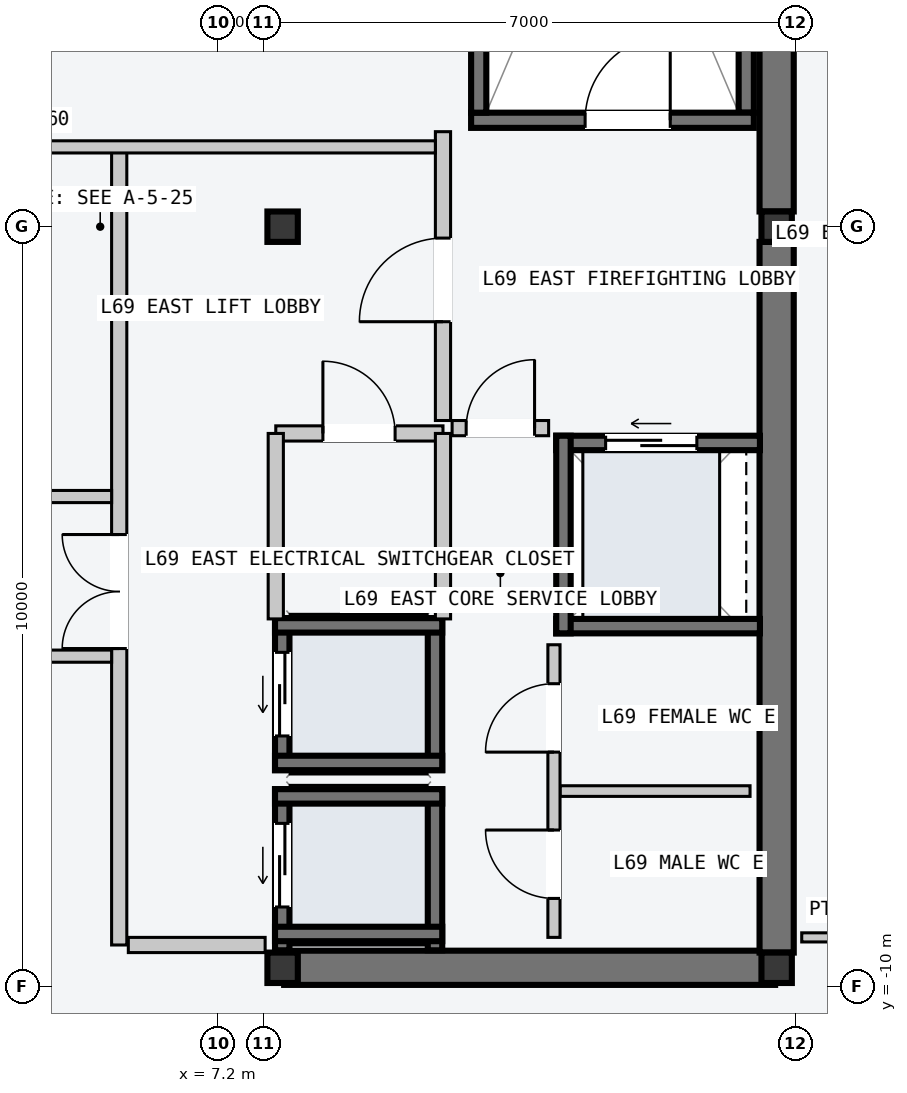
"""IFC4 building model, lengths in metres.
Left out: names, types, materials, properties, quantities, classifications, styles, units other than length and angle.
Written with IfcOpenShell. Run it as: python <this file> out.ifc"""

import sys

from ifc_helpers import new_model, si_unit, direction, frame, frame_2d, origin, origin_2d, place, context, subcontext, project, spatial, rectangle, i_section, extrude, element, fill, save


model = new_model("IFC4")
c1 = context("Model", 3, precision=1e-05, world=origin(), true_north=direction((0.0, 1.0)))
c2 = subcontext(c1, "Body", "Model", "MODEL_VIEW")
j1 = project(units=[si_unit("LENGTHUNIT", "METRE"), si_unit("PLANEANGLEUNIT", "RADIAN")], contexts=[c1])
p1 = place(None, origin())
s1 = spatial("IfcSite", under=j1, at=p1, CompositionType="ELEMENT")
p2 = place(p1, origin())
s2 = spatial("IfcBuilding", under=s1, at=p2, CompositionType="ELEMENT")
p3 = place(p2, frame((0.0, 0.0, 261.6)))
s3 = spatial("IfcBuildingStorey", under=s2, at=p3, CompositionType="ELEMENT", Elevation=261.6)
p4 = place(p3, frame((8.07, -9.75, -0.2), z_axis=(0.0, 0.0, 1.0), x_axis=(1.0, 0.0, 0.0)))
e1 = element("IfcWall", 1, at=p4, inside=s3, PredefinedType="SHEAR", context=c2, shape_type="SweptSolid", body=[
    extrude(rectangle(XDim=6.46, YDim=0.45, at=frame_2d((3.23, 0.0))), origin(), (0.0, 0.0, 1.0), 3.6),
])
for number, where, z_axis, x_axis in (
    (2, (14.55, -9.55, -0.2), (0.0, 0.0, 1.0), (0.0, 1.0, 0.0)),
    (3, (14.55, 0.2, -0.2), (0.0, 0.0, 1.0), (0.0, 1.0, 0.0)),
):
    element("IfcWall", number, at=place(p3, frame(where, z_axis=z_axis, x_axis=x_axis)), inside=s3, PredefinedType="SHEAR", context=c2, shape_type="SweptSolid", body=[
        extrude(rectangle(XDim=9.35, YDim=0.45, at=frame_2d((4.675, 0.0))), origin(), (0.0, 0.0, 1.0), 3.6),
    ])
p5 = place(p3, frame((14.15, 1.5, -0.2), z_axis=(0.0, 0.0, 1.0), x_axis=(0.0, 1.0, 0.0)))
e4 = element("IfcWall", 4, at=p5, inside=s3, PredefinedType="SOLIDWALL", context=c2, shape_type="SweptSolid", body=[
    extrude(rectangle(XDim=7.8, YDim=0.2, at=frame_2d((3.9, 0.0))), origin(), (0.0, 0.0, 1.0), 3.6),
])
p6 = place(p3, frame((10.53, 1.4, -0.2), z_axis=(0.0, 0.0, 1.0), x_axis=(1.0, 0.0, 0.0)))
e5 = element("IfcWall", 5, at=p6, inside=s3, PredefinedType="SOLIDWALL", context=c2, shape_type="SweptSolid", body=[
    extrude(rectangle(XDim=3.72, YDim=0.2, at=frame_2d((1.86, 0.0))), origin(), (0.0, 0.0, 1.0), 3.6),
])
p7 = place(p6, frame((1.5, 0.0, 0.2)))
e6 = element("IfcOpeningElement", 6, at=p7, cuts=e5, PredefinedType="OPENING", context=c2, shape_type="SweptSolid", body=[
    extrude(rectangle(XDim=1.12, YDim=2.18, at=frame_2d((0.56, 1.09))), frame((0.0, 0.11, 0.0), z_axis=(0.0, -1.0, 0.0), x_axis=(1.0, 0.0, 0.0)), (0.0, 0.0, 1.0), 0.22),
])
p8 = place(p3, frame((10.63, 1.5, -0.2), z_axis=(0.0, 0.0, 1.0), x_axis=(0.0, 1.0, 0.0)))
e7 = element("IfcWall", 7, at=p8, inside=s3, PredefinedType="SOLIDWALL", context=c2, shape_type="SweptSolid", body=[
    extrude(rectangle(XDim=7.8, YDim=0.2, at=frame_2d((3.9, 0.0))), origin(), (0.0, 0.0, 1.0), 3.6),
])
for number, where, z_axis, x_axis in (
    (8, (8.05, -9.75, 0.0), (0.0, 0.0, 1.0), (1.0, 0.0, 0.0)),
    (9, (8.05, 0.0, 0.0), (0.0, 0.0, 1.0), (1.0, 0.0, 0.0)),
    (10, (14.55, -9.75, 0.0), (0.0, 0.0, 1.0), (1.0, 0.0, 0.0)),
    (11, (14.55, 0.0, 0.0), (0.0, 0.0, 1.0), (1.0, 0.0, 0.0)),
):
    element("IfcColumn", number, at=place(p3, frame(where, z_axis=z_axis, x_axis=x_axis)), inside=s3, PredefinedType="COLUMN", context=c2, shape_type="SweptSolid", body=[
        extrude(i_section(OverallWidth=0.4, OverallDepth=0.4, WebThickness=0.013, FlangeThickness=0.021, at=origin_2d()), origin(), (0.0, 0.0, 1.0), 3.6),
    ])
p9 = place(p3, frame((8.045, -9.52, -0.2), z_axis=(0.0, 0.0, 1.0), x_axis=(0.0, 1.0, 0.0)))
e12 = element("IfcWall", 12, at=p9, inside=s3, PredefinedType="SOLIDWALL", context=c2, shape_type="SweptSolid", body=[
    extrude(rectangle(XDim=2.12, YDim=0.19, at=frame_2d((1.06, 0.0))), origin(), (0.0, 0.0, 1.0), 3.6),
])
p10 = place(p9, frame((0.57, 0.0, 0.2)))
e13 = element("IfcOpeningElement", 13, at=p10, cuts=e12, PredefinedType="OPENING", context=c2, shape_type="SweptSolid", body=[
    extrude(rectangle(XDim=1.1, YDim=2.2, at=frame_2d((0.55, 1.1))), frame((0.0, 0.105, 0.0), z_axis=(0.0, -1.0, 0.0), x_axis=(1.0, 0.0, 0.0)), (0.0, 0.0, 1.0), 0.21),
])
p11 = place(p3, frame((10.055, -9.52, -0.2), z_axis=(0.0, 0.0, 1.0), x_axis=(0.0, 1.0, 0.0)))
e14 = element("IfcWall", 14, at=p11, inside=s3, PredefinedType="SOLIDWALL", context=c2, shape_type="SweptSolid", body=[
    extrude(rectangle(XDim=2.12, YDim=0.19, at=frame_2d((1.06, 0.0))), origin(), (0.0, 0.0, 1.0), 3.6),
])
for number, where, z_axis, x_axis in (
    (15, (7.95, -7.495, -0.2), (0.0, 0.0, 1.0), (1.0, 0.0, 0.0)),
    (16, (7.95, -9.305, -0.2), (0.0, 0.0, 1.0), (1.0, 0.0, 0.0)),
):
    element("IfcWall", number, at=place(p3, frame(where, z_axis=z_axis, x_axis=x_axis)), inside=s3, PredefinedType="SOLIDWALL", context=c2, shape_type="SweptSolid", body=[
        extrude(rectangle(XDim=2.2, YDim=0.19, at=frame_2d((1.1, 0.0))), origin(), (0.0, 0.0, 1.0), 3.6),
    ])
p12 = place(p3, frame((8.045, -7.15, -0.2), z_axis=(0.0, 0.0, 1.0), x_axis=(0.0, 1.0, 0.0)))
e17 = element("IfcWall", 17, at=p12, inside=s3, PredefinedType="SOLIDWALL", context=c2, shape_type="SweptSolid", body=[
    extrude(rectangle(XDim=2.0, YDim=0.19, at=frame_2d((1.0, 0.0))), origin(), (0.0, 0.0, 1.0), 3.6),
])
p13 = place(p12, frame((0.45, 0.0, 0.2)))
e18 = element("IfcOpeningElement", 18, at=p13, cuts=e17, PredefinedType="OPENING", context=c2, shape_type="SweptSolid", body=[
    extrude(rectangle(XDim=1.1, YDim=2.2, at=frame_2d((0.55, 1.1))), frame((0.0, 0.105, 0.0), z_axis=(0.0, -1.0, 0.0), x_axis=(1.0, 0.0, 0.0)), (0.0, 0.0, 1.0), 0.21),
])
p14 = place(p3, frame((10.055, -7.15, -0.2), z_axis=(0.0, 0.0, 1.0), x_axis=(0.0, 1.0, 0.0)))
e19 = element("IfcWall", 19, at=p14, inside=s3, PredefinedType="SOLIDWALL", context=c2, shape_type="SweptSolid", body=[
    extrude(rectangle(XDim=2.0, YDim=0.19, at=frame_2d((1.0, 0.0))), origin(), (0.0, 0.0, 1.0), 3.6),
])
for number, where, z_axis, x_axis in (
    (20, (7.95, -5.245, -0.2), (0.0, 0.0, 1.0), (1.0, 0.0, 0.0)),
    (21, (7.95, -7.055, -0.2), (0.0, 0.0, 1.0), (1.0, 0.0, 0.0)),
):
    element("IfcWall", number, at=place(p3, frame(where, z_axis=z_axis, x_axis=x_axis)), inside=s3, PredefinedType="SOLIDWALL", context=c2, shape_type="SweptSolid", body=[
        extrude(rectangle(XDim=2.2, YDim=0.19, at=frame_2d((1.1, 0.0))), origin(), (0.0, 0.0, 1.0), 3.6),
    ])
p15 = place(p3, frame((11.65, -2.845, -0.2), z_axis=(0.0, 0.0, 1.0), x_axis=(1.0, 0.0, 0.0)))
e22 = element("IfcWall", 22, at=p15, inside=s3, PredefinedType="SOLIDWALL", context=c2, shape_type="SweptSolid", body=[
    extrude(rectangle(XDim=2.68, YDim=0.19, at=frame_2d((1.34, 0.0))), origin(), (0.0, 0.0, 1.0), 3.6),
])
p16 = place(p15, frame((0.65, 0.0, 0.2)))
e23 = element("IfcOpeningElement", 23, at=p16, cuts=e22, PredefinedType="OPENING", context=c2, shape_type="SweptSolid", body=[
    extrude(rectangle(XDim=1.2, YDim=2.2, at=frame_2d((0.6, 1.1))), frame((0.0, 0.105, 0.0), z_axis=(0.0, -1.0, 0.0), x_axis=(1.0, 0.0, 0.0)), (0.0, 0.0, 1.0), 0.21),
])
p17 = place(p3, frame((11.65, -5.255, -0.2), z_axis=(0.0, 0.0, 1.0), x_axis=(1.0, 0.0, 0.0)))
e24 = element("IfcWall", 24, at=p17, inside=s3, PredefinedType="SOLIDWALL", context=c2, shape_type="SweptSolid", body=[
    extrude(rectangle(XDim=2.68, YDim=0.19, at=frame_2d((1.34, 0.0))), origin(), (0.0, 0.0, 1.0), 3.6),
])
p18 = place(p3, frame((11.745, -5.35, -0.2), z_axis=(0.0, 0.0, 1.0), x_axis=(0.0, 1.0, 0.0)))
e25 = element("IfcWall", 25, at=p18, inside=s3, PredefinedType="SOLIDWALL", context=c2, shape_type="SweptSolid", body=[
    extrude(rectangle(XDim=2.6, YDim=0.19, at=frame_2d((1.3, 0.0))), origin(), (0.0, 0.0, 1.0), 3.6),
])
p19 = place(p3, frame((5.9, -9.45, 0.0), z_axis=(0.0, 0.0, 1.0), x_axis=(0.0, 1.0, 0.0)))
e26 = element("IfcWall", 26, at=p19, inside=s3, PredefinedType="PARTITIONING", context=c2, shape_type="SweptSolid", body=[
    extrude(rectangle(XDim=10.5, YDim=0.2, at=frame_2d((5.25, 0.0))), origin(), (0.0, 0.0, 1.0), 3.4),
])
p20 = place(p19, frame((3.9, 0.0, 0.0)))
e27 = element("IfcOpeningElement", 27, at=p20, cuts=e26, PredefinedType="OPENING", context=c2, shape_type="SweptSolid", body=[
    extrude(rectangle(XDim=1.5, YDim=2.2, at=frame_2d((0.75, 1.1))), frame((0.0, 0.11, 0.0), z_axis=(0.0, -1.0, 0.0), x_axis=(1.0, 0.0, 0.0)), (0.0, 0.0, 1.0), 0.22),
])
p21 = place(p3, frame((6.02, -9.45, 0.0), z_axis=(0.0, 0.0, 1.0), x_axis=(1.0, 0.0, 0.0)))
e28 = element("IfcWall", 28, at=p21, inside=s3, PredefinedType="PARTITIONING", context=c2, shape_type="SweptSolid", body=[
    extrude(rectangle(XDim=1.8, YDim=0.2, at=frame_2d((0.9, 0.0))), origin(), (0.0, 0.0, 1.0), 3.4),
])
p22 = place(p3, frame((10.16, -2.55, 0.0), z_axis=(0.0, 0.0, 1.0), x_axis=(0.0, 1.0, 0.0)))
e29 = element("IfcWall", 29, at=p22, inside=s3, PredefinedType="PARTITIONING", context=c2, shape_type="SweptSolid", body=[
    extrude(rectangle(XDim=3.8, YDim=0.2, at=frame_2d((1.9, 0.0))), origin(), (0.0, 0.0, 1.0), 3.4),
])
p23 = place(p22, frame((1.3, 0.0, 0.0)))
e30 = element("IfcOpeningElement", 30, at=p23, cuts=e29, PredefinedType="OPENING", context=c2, shape_type="SweptSolid", body=[
    extrude(rectangle(XDim=1.1, YDim=2.15, at=frame_2d((0.55, 1.075))), frame((0.0, 0.11, 0.0), z_axis=(0.0, -1.0, 0.0), x_axis=(1.0, 0.0, 0.0)), (0.0, 0.0, 1.0), 0.22),
])
p24 = place(p3, frame((10.28, -2.65, 0.0), z_axis=(0.0, 0.0, 1.0), x_axis=(1.0, 0.0, 0.0)))
e31 = element("IfcWall", 31, at=p24, inside=s3, PredefinedType="PARTITIONING", context=c2, shape_type="SweptSolid", body=[
    extrude(rectangle(XDim=1.27, YDim=0.2, at=frame_2d((0.635, 0.0))), origin(), (0.0, 0.0, 1.0), 3.4),
])
p25 = place(p24, frame((0.185, 0.0, 0.0)))
e32 = element("IfcOpeningElement", 32, at=p25, cuts=e31, PredefinedType="OPENING", context=c2, shape_type="SweptSolid", body=[
    extrude(rectangle(XDim=0.9, YDim=2.15, at=frame_2d((0.45, 1.075))), frame((0.0, 0.11, 0.0), z_axis=(0.0, -1.0, 0.0), x_axis=(1.0, 0.0, 0.0)), (0.0, 0.0, 1.0), 0.22),
])
p26 = place(p3, frame((7.96, -2.72, 0.0), z_axis=(0.0, 0.0, 1.0), x_axis=(1.0, 0.0, 0.0)))
e33 = element("IfcWall", 33, at=p26, inside=s3, PredefinedType="PARTITIONING", context=c2, shape_type="SweptSolid", body=[
    extrude(rectangle(XDim=2.2, YDim=0.2, at=frame_2d((1.1, 0.0))), origin(), (0.0, 0.0, 1.0), 3.4),
])
p27 = place(p26, frame((0.62, 0.0, 0.0)))
e34 = element("IfcOpeningElement", 34, at=p27, cuts=e33, PredefinedType="OPENING", context=c2, shape_type="SweptSolid", body=[
    extrude(rectangle(XDim=0.95, YDim=2.1, at=frame_2d((0.475, 1.05))), frame((0.0, 0.11, 0.0), z_axis=(0.0, -1.0, 0.0), x_axis=(1.0, 0.0, 0.0)), (0.0, 0.0, 1.0), 0.22),
])
for number, where, z_axis, x_axis in (
    (35, (7.96, -5.16, 0.0), (0.0, 0.0, 1.0), (0.0, 1.0, 0.0)),
    (36, (10.16, -5.16, 0.0), (0.0, 0.0, 1.0), (0.0, 1.0, 0.0)),
):
    element("IfcWall", number, at=place(p3, frame(where, z_axis=z_axis, x_axis=x_axis)), inside=s3, PredefinedType="PARTITIONING", context=c2, shape_type="SweptSolid", body=[
        extrude(rectangle(XDim=2.44, YDim=0.2, at=frame_2d((1.22, 0.0))), origin(), (0.0, 0.0, 1.0), 3.4),
    ])
p28 = place(p3, frame((11.7, -7.425, 0.0), z_axis=(0.0, 0.0, 1.0), x_axis=(1.0, 0.0, 0.0)))
e37 = element("IfcWall", 37, at=p28, inside=s3, PredefinedType="PARTITIONING", context=c2, shape_type="SweptSolid", body=[
    extrude(rectangle(XDim=2.5, YDim=0.14, at=frame_2d((1.25, 0.0))), origin(), (0.0, 0.0, 1.0), 3.4),
])
p29 = place(p3, frame((11.62, -9.35, 0.0), z_axis=(0.0, 0.0, 1.0), x_axis=(0.0, 1.0, 0.0)))
e38 = element("IfcWall", 38, at=p29, inside=s3, PredefinedType="PARTITIONING", context=c2, shape_type="SweptSolid", body=[
    extrude(rectangle(XDim=3.85, YDim=0.16, at=frame_2d((1.925, 0.0))), origin(), (0.0, 0.0, 1.0), 3.4),
])
p30 = place(p29, frame((0.512, 0.0, 0.0)))
e39 = element("IfcOpeningElement", 39, at=p30, cuts=e38, PredefinedType="OPENING", context=c2, shape_type="SweptSolid", body=[
    extrude(rectangle(XDim=0.9, YDim=2.15, at=frame_2d((0.45, 1.075))), frame((0.0, 0.09, 0.0), z_axis=(0.0, -1.0, 0.0), x_axis=(1.0, 0.0, 0.0)), (0.0, 0.0, 1.0), 0.18),
])
p31 = place(p29, frame((2.438, 0.0, 0.0)))
e40 = element("IfcOpeningElement", 40, at=p31, cuts=e38, PredefinedType="OPENING", context=c2, shape_type="SweptSolid", body=[
    extrude(rectangle(XDim=0.9, YDim=2.15, at=frame_2d((0.45, 1.075))), frame((0.0, 0.09, 0.0), z_axis=(0.0, -1.0, 0.0), x_axis=(1.0, 0.0, 0.0)), (0.0, 0.0, 1.0), 0.18),
])
p32 = place(p3, frame((-0.49, 1.05, 0.0), z_axis=(0.0, 0.0, 1.0), x_axis=(1.0, 0.0, 0.0)))
e41 = element("IfcWall", 41, at=p32, inside=s3, PredefinedType="PARTITIONING", context=c2, shape_type="SweptSolid", body=[
    extrude(rectangle(XDim=10.55, YDim=0.16, at=frame_2d((5.275, 0.0))), origin(), (0.0, 0.0, 1.0), 3.4),
])
for number, where, z_axis, x_axis in (
    (42, (-0.49, -3.55, 0.0), (0.0, 0.0, 1.0), (1.0, 0.0, 0.0)),
    (43, (-0.49, -5.65, 0.0), (0.0, 0.0, 1.0), (1.0, 0.0, 0.0)),
):
    element("IfcWall", number, at=place(p3, frame(where, z_axis=z_axis, x_axis=x_axis)), inside=s3, PredefinedType="PARTITIONING", context=c2, shape_type="SweptSolid", body=[
        extrude(rectangle(XDim=6.29, YDim=0.16, at=frame_2d((3.145, 0.0))), origin(), (0.0, 0.0, 1.0), 3.4),
    ])
p33 = place(p3, frame((14.88, -9.35, 0.0), z_axis=(0.0, 0.0, 1.0), x_axis=(1.0, 0.0, 0.0)))
e44 = element("IfcWall", 44, at=p33, inside=s3, PredefinedType="PARTITIONING", context=c2, shape_type="SweptSolid", body=[
    extrude(rectangle(XDim=3.68, YDim=0.12, at=frame_2d((1.84, 0.0))), origin(), (0.0, 0.0, 1.0), 3.4),
])
p34 = place(p33, frame((1.36, 0.0, 0.0)))
e45 = element("IfcOpeningElement", 45, at=p34, cuts=e44, PredefinedType="OPENING", context=c2, shape_type="SweptSolid", body=[
    extrude(rectangle(XDim=0.96, YDim=2.18, at=frame_2d((0.48, 1.09))), frame((0.0, 0.07, 0.0), z_axis=(0.0, -1.0, 0.0), x_axis=(1.0, 0.0, 0.0)), (0.0, 0.0, 1.0), 0.14),
])
p35 = place(p7, origin())
e46 = element("IfcDoor", 46, at=p35, inside=s3, OperationType="SINGLE_SWING_RIGHT", PredefinedType="DOOR", context=c2, shape_type="SweptSolid", body=[
    extrude(rectangle(XDim=1.12, YDim=2.18, at=frame_2d((0.56, 1.09))), frame((0.0, 0.025, 0.0), z_axis=(0.0, -1.0, 0.0), x_axis=(1.0, 0.0, 0.0)), (0.0, 0.0, 1.0), 0.05),
])
fill(e6, e46)
p36 = place(p10, origin())
e47 = element("IfcDoor", 47, at=p36, inside=s3, OperationType="SLIDING_TO_LEFT", PredefinedType="DOOR", context=c2, shape_type="SweptSolid", body=[
    extrude(rectangle(XDim=1.1, YDim=2.2, at=frame_2d((0.55, 1.1))), frame((0.0, 0.025, 0.0), z_axis=(0.0, -1.0, 0.0), x_axis=(1.0, 0.0, 0.0)), (0.0, 0.0, 1.0), 0.05),
])
fill(e13, e47)
p37 = place(p13, origin())
e48 = element("IfcDoor", 48, at=p37, inside=s3, OperationType="SLIDING_TO_LEFT", PredefinedType="DOOR", context=c2, shape_type="SweptSolid", body=[
    extrude(rectangle(XDim=1.1, YDim=2.2, at=frame_2d((0.55, 1.1))), frame((0.0, 0.025, 0.0), z_axis=(0.0, -1.0, 0.0), x_axis=(1.0, 0.0, 0.0)), (0.0, 0.0, 1.0), 0.05),
])
fill(e18, e48)
p38 = place(p16, origin())
e49 = element("IfcDoor", 49, at=p38, inside=s3, OperationType="SLIDING_TO_LEFT", PredefinedType="DOOR", context=c2, shape_type="SweptSolid", body=[
    extrude(rectangle(XDim=1.2, YDim=2.2, at=frame_2d((0.6, 1.1))), frame((0.0, 0.025, 0.0), z_axis=(0.0, -1.0, 0.0), x_axis=(1.0, 0.0, 0.0)), (0.0, 0.0, 1.0), 0.05),
])
fill(e23, e49)
p39 = place(p20, origin())
e50 = element("IfcDoor", 50, at=p39, inside=s3, OperationType="DOUBLE_DOOR_SINGLE_SWING", PredefinedType="DOOR", context=c2, shape_type="SweptSolid", body=[
    extrude(rectangle(XDim=1.5, YDim=2.2, at=frame_2d((0.75, 1.1))), frame((0.0, 0.025, 0.0), z_axis=(0.0, -1.0, 0.0), x_axis=(1.0, 0.0, 0.0)), (0.0, 0.0, 1.0), 0.05),
])
fill(e27, e50)
p40 = place(p23, origin())
e51 = element("IfcDoor", 51, at=p40, inside=s3, OperationType="SINGLE_SWING_LEFT", PredefinedType="DOOR", context=c2, shape_type="SweptSolid", body=[
    extrude(rectangle(XDim=1.1, YDim=2.15, at=frame_2d((0.55, 1.075))), frame((0.0, 0.025, 0.0), z_axis=(0.0, -1.0, 0.0), x_axis=(1.0, 0.0, 0.0)), (0.0, 0.0, 1.0), 0.05),
])
fill(e30, e51)
p41 = place(p25, origin())
e52 = element("IfcDoor", 52, at=p41, inside=s3, OperationType="SINGLE_SWING_RIGHT", PredefinedType="DOOR", context=c2, shape_type="SweptSolid", body=[
    extrude(rectangle(XDim=0.9, YDim=2.15, at=frame_2d((0.45, 1.075))), frame((0.0, 0.025, 0.0), z_axis=(0.0, -1.0, 0.0), x_axis=(1.0, 0.0, 0.0)), (0.0, 0.0, 1.0), 0.05),
])
fill(e32, e52)
p42 = place(p27, origin())
e53 = element("IfcDoor", 53, at=p42, inside=s3, OperationType="SINGLE_SWING_LEFT", PredefinedType="DOOR", context=c2, shape_type="SweptSolid", body=[
    extrude(rectangle(XDim=0.95, YDim=2.1, at=frame_2d((0.475, 1.05))), frame((0.0, 0.025, 0.0), z_axis=(0.0, -1.0, 0.0), x_axis=(1.0, 0.0, 0.0)), (0.0, 0.0, 1.0), 0.05),
])
fill(e34, e53)
p43 = place(p30, origin())
e54 = element("IfcDoor", 54, at=p43, inside=s3, OperationType="SINGLE_SWING_RIGHT", PredefinedType="DOOR", context=c2, shape_type="SweptSolid", body=[
    extrude(rectangle(XDim=0.9, YDim=2.15, at=frame_2d((0.45, 1.075))), frame((0.0, 0.025, 0.0), z_axis=(0.0, -1.0, 0.0), x_axis=(1.0, 0.0, 0.0)), (0.0, 0.0, 1.0), 0.05),
])
fill(e39, e54)
p44 = place(p31, origin())
e55 = element("IfcDoor", 55, at=p44, inside=s3, OperationType="SINGLE_SWING_LEFT", PredefinedType="DOOR", context=c2, shape_type="SweptSolid", body=[
    extrude(rectangle(XDim=0.9, YDim=2.15, at=frame_2d((0.45, 1.075))), frame((0.0, 0.025, 0.0), z_axis=(0.0, -1.0, 0.0), x_axis=(1.0, 0.0, 0.0)), (0.0, 0.0, 1.0), 0.05),
])
fill(e40, e55)
save(model, sys.argv[1])
